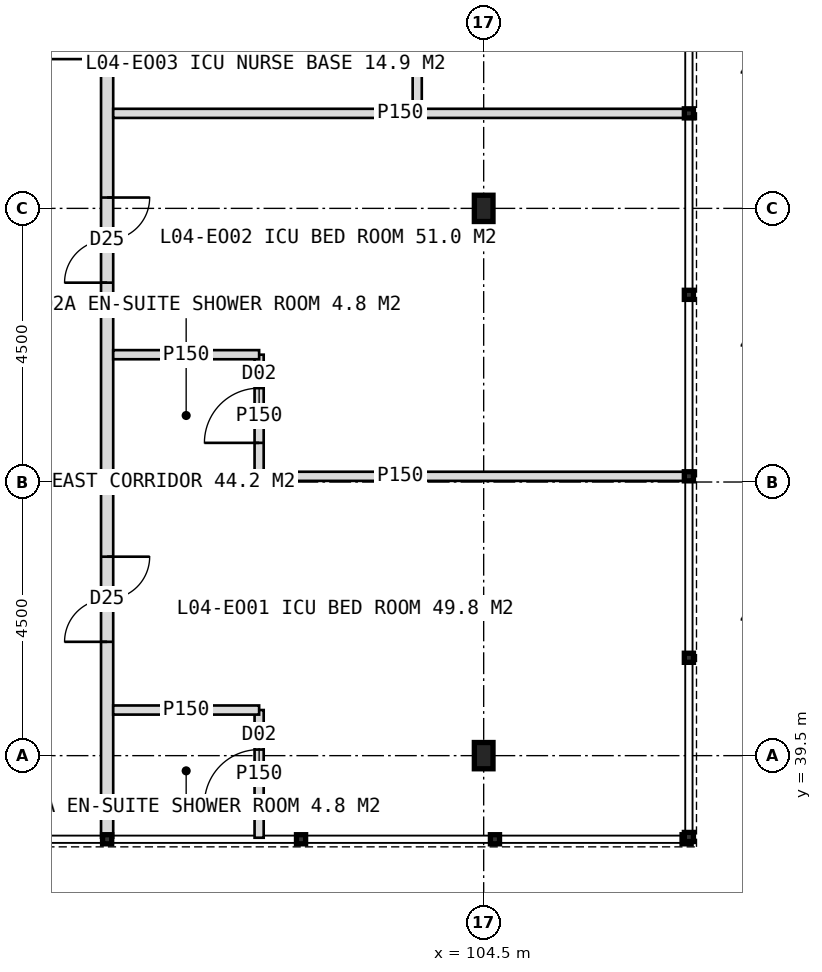
"""IFC4 building model, lengths in metres.
Left out: names, types, materials, properties, quantities, classifications, styles, units other than length and angle.
Written with IfcOpenShell. Run it as: python <this file> out.ifc"""

import sys

from ifc_helpers import new_model, si_unit, direction, frame, frame_2d, origin, origin_2d, place, context, subcontext, project, spatial, rectangle, i_section, extrude, element, fill, save


model = new_model("IFC4")
c1 = context("Model", 3, precision=1e-05, world=origin(), true_north=direction((0.0, 1.0)))
c2 = subcontext(c1, "Body", "Model", "MODEL_VIEW")
j1 = project(units=[si_unit("LENGTHUNIT", "METRE"), si_unit("PLANEANGLEUNIT", "RADIAN")], contexts=[c1])
p1 = place(None, origin())
s1 = spatial("IfcSite", under=j1, at=p1, CompositionType="ELEMENT")
p2 = place(p1, origin())
s2 = spatial("IfcBuilding", under=s1, at=p2, CompositionType="ELEMENT")
p3 = place(p2, frame((0.0, 0.0, 21.0)))
s3 = spatial("IfcBuildingStorey", under=s2, at=p3, CompositionType="ELEMENT", Elevation=21.0)
for number, where, z_axis, x_axis in (
    (1, (104.5, 39.5, 0.0), (0.0, 0.0, 1.0), (1.0, 0.0, 0.0)),
    (2, (104.5, 48.5, 0.0), (0.0, 0.0, 1.0), (1.0, 0.0, 0.0)),
):
    element("IfcColumn", number, at=place(p3, frame(where, z_axis=z_axis, x_axis=x_axis)), inside=s3, PredefinedType="COLUMN", context=c2, shape_type="SweptSolid", body=[
        extrude(i_section(OverallWidth=0.307, OverallDepth=0.432, WebThickness=0.021, FlangeThickness=0.04, FilletRadius=0.027, at=origin_2d()), origin(), (0.0, 0.0, 1.0), 5.0),
    ])
p4 = place(p3, frame((98.307, 38.15, 0.0), z_axis=(0.0, 0.0, 1.0), x_axis=(0.0, 1.0, 0.0)))
e3 = element("IfcWall", 3, at=p4, inside=s3, PredefinedType="PARTITIONING", context=c2, shape_type="SweptSolid", body=[
    extrude(rectangle(XDim=47.7, YDim=0.2, at=frame_2d((23.85, 0.0))), origin(), (0.0, 0.0, 1.0), 4.7),
])
p5 = place(p4, frame((45.7, 0.0, 0.0)))
e4 = element("IfcOpeningElement", 4, at=p5, cuts=e3, PredefinedType="OPENING", context=c2, shape_type="SweptSolid", body=[
    extrude(rectangle(XDim=1.2, YDim=2.1, at=frame_2d((0.6, 1.05))), frame((0.0, 0.11, 0.0), z_axis=(0.0, -1.0, 0.0), x_axis=(1.0, 0.0, 0.0)), (0.0, 0.0, 1.0), 0.22),
])
p6 = place(p4, frame((36.244, 0.0, 0.0)))
e5 = element("IfcOpeningElement", 5, at=p6, cuts=e3, PredefinedType="OPENING", context=c2, shape_type="SweptSolid", body=[
    extrude(rectangle(XDim=1.0, YDim=2.1, at=frame_2d((0.5, 1.05))), frame((0.0, 0.11, 0.0), z_axis=(0.0, -1.0, 0.0), x_axis=(1.0, 0.0, 0.0)), (0.0, 0.0, 1.0), 0.22),
])
p7 = place(p4, frame((15.297, 0.0, 0.0)))
e6 = element("IfcOpeningElement", 6, at=p7, cuts=e3, PredefinedType="OPENING", context=c2, shape_type="SweptSolid", body=[
    extrude(rectangle(XDim=1.4, YDim=2.2, at=frame_2d((0.7, 1.1))), frame((0.0, 0.11, 0.0), z_axis=(0.0, -1.0, 0.0), x_axis=(1.0, 0.0, 0.0)), (0.0, 0.0, 1.0), 0.22),
])
p8 = place(p4, frame((3.222, 0.0, 0.0)))
e7 = element("IfcOpeningElement", 7, at=p8, cuts=e3, PredefinedType="OPENING", context=c2, shape_type="SweptSolid", body=[
    extrude(rectangle(XDim=1.4, YDim=2.2, at=frame_2d((0.7, 1.1))), frame((0.0, 0.11, 0.0), z_axis=(0.0, -1.0, 0.0), x_axis=(1.0, 0.0, 0.0)), (0.0, 0.0, 1.0), 0.22),
])
p9 = place(p4, frame((9.128, 0.0, 0.0)))
e8 = element("IfcOpeningElement", 8, at=p9, cuts=e3, PredefinedType="OPENING", context=c2, shape_type="SweptSolid", body=[
    extrude(rectangle(XDim=1.4, YDim=2.2, at=frame_2d((0.7, 1.1))), frame((0.0, 0.11, 0.0), z_axis=(0.0, -1.0, 0.0), x_axis=(1.0, 0.0, 0.0)), (0.0, 0.0, 1.0), 0.22),
])
p10 = place(p4, frame((12.805, 0.0, 0.0)))
e9 = element("IfcOpeningElement", 9, at=p10, cuts=e3, PredefinedType="OPENING", context=c2, shape_type="SweptSolid", body=[
    extrude(rectangle(XDim=1.0, YDim=2.1, at=frame_2d((0.5, 1.05))), frame((0.0, 0.11, 0.0), z_axis=(0.0, -1.0, 0.0), x_axis=(1.0, 0.0, 0.0)), (0.0, 0.0, 1.0), 0.22),
])
p11 = place(p4, frame((24.05, 0.0, 0.0)))
e10 = element("IfcOpeningElement", 10, at=p11, cuts=e3, PredefinedType="OPENING", context=c2, shape_type="SweptSolid", body=[
    extrude(rectangle(XDim=1.4, YDim=2.2, at=frame_2d((0.7, 1.1))), frame((0.0, 0.11, 0.0), z_axis=(0.0, -1.0, 0.0), x_axis=(1.0, 0.0, 0.0)), (0.0, 0.0, 1.0), 0.22),
])
p12 = place(p4, frame((30.019, 0.0, 0.0)))
e11 = element("IfcOpeningElement", 11, at=p12, cuts=e3, PredefinedType="OPENING", context=c2, shape_type="SweptSolid", body=[
    extrude(rectangle(XDim=1.4, YDim=2.2, at=frame_2d((0.7, 1.1))), frame((0.0, 0.11, 0.0), z_axis=(0.0, -1.0, 0.0), x_axis=(1.0, 0.0, 0.0)), (0.0, 0.0, 1.0), 0.22),
])
p13 = place(p4, frame((33.695, 0.0, 0.0)))
e12 = element("IfcOpeningElement", 12, at=p13, cuts=e3, PredefinedType="OPENING", context=c2, shape_type="SweptSolid", body=[
    extrude(rectangle(XDim=1.0, YDim=2.1, at=frame_2d((0.5, 1.05))), frame((0.0, 0.11, 0.0), z_axis=(0.0, -1.0, 0.0), x_axis=(1.0, 0.0, 0.0)), (0.0, 0.0, 1.0), 0.22),
])
for number, where, z_axis, x_axis in (
    (13, (107.85, 44.094, 0.0), (0.0, 0.0, 1.0), (-1.0, 0.0, 0.0)),
    (14, (107.85, 50.062, 0.0), (0.0, 0.0, 1.0), (-1.0, 0.0, 0.0)),
):
    element("IfcWall", number, at=place(p3, frame(where, z_axis=z_axis, x_axis=x_axis)), inside=s3, PredefinedType="PARTITIONING", context=c2, shape_type="SweptSolid", body=[
        extrude(rectangle(XDim=9.443, YDim=0.15, at=frame_2d((4.722, 0.0))), origin(), (0.0, 0.0, 1.0), 4.7),
    ])
p14 = place(p3, frame((103.407, 50.062, 0.0), z_axis=(0.0, 0.0, 1.0), x_axis=(0.0, 1.0, 0.0)))
e15 = element("IfcWall", 15, at=p14, inside=s3, PredefinedType="PARTITIONING", context=c2, shape_type="SweptSolid", body=[
    extrude(rectangle(XDim=2.984, YDim=0.15, at=frame_2d((1.492, 0.0))), origin(), (0.0, 0.0, 1.0), 4.7),
])
p15 = place(p14, frame((0.992, 0.0, 0.0)))
e16 = element("IfcOpeningElement", 16, at=p15, cuts=e15, PredefinedType="OPENING", context=c2, shape_type="SweptSolid", body=[
    extrude(rectangle(XDim=1.0, YDim=2.1, at=frame_2d((0.5, 1.05))), frame((0.0, 0.085, 0.0), z_axis=(0.0, -1.0, 0.0), x_axis=(1.0, 0.0, 0.0)), (0.0, 0.0, 1.0), 0.17),
])
p16 = place(p3, frame((100.807, 38.15, 0.0), z_axis=(0.0, 0.0, 1.0), x_axis=(0.0, 1.0, 0.0)))
e17 = element("IfcWall", 17, at=p16, inside=s3, PredefinedType="PARTITIONING", context=c2, shape_type="SweptSolid", body=[
    extrude(rectangle(XDim=2.1, YDim=0.15, at=frame_2d((1.05, 0.0))), origin(), (0.0, 0.0, 1.0), 4.7),
])
p17 = place(p16, frame((0.55, 0.0, 0.0)))
e18 = element("IfcOpeningElement", 18, at=p17, cuts=e17, PredefinedType="OPENING", context=c2, shape_type="SweptSolid", body=[
    extrude(rectangle(XDim=0.9, YDim=2.1, at=frame_2d((0.45, 1.05))), frame((0.0, 0.085, 0.0), z_axis=(0.0, -1.0, 0.0), x_axis=(1.0, 0.0, 0.0)), (0.0, 0.0, 1.0), 0.17),
])
p18 = place(p3, frame((98.407, 40.25, 0.0), z_axis=(0.0, 0.0, 1.0), x_axis=(1.0, 0.0, 0.0)))
e19 = element("IfcWall", 19, at=p18, inside=s3, PredefinedType="PARTITIONING", context=c2, shape_type="SweptSolid", body=[
    extrude(rectangle(XDim=2.4, YDim=0.15, at=frame_2d((1.2, 0.0))), origin(), (0.0, 0.0, 1.0), 4.7),
])
p19 = place(p3, frame((100.807, 44.094, 0.0), z_axis=(0.0, 0.0, 1.0), x_axis=(0.0, 1.0, 0.0)))
e20 = element("IfcWall", 20, at=p19, inside=s3, PredefinedType="PARTITIONING", context=c2, shape_type="SweptSolid", body=[
    extrude(rectangle(XDim=2.0, YDim=0.15, at=frame_2d((1.0, 0.0))), origin(), (0.0, 0.0, 1.0), 4.7),
])
p20 = place(p19, frame((0.55, 0.0, 0.0)))
e21 = element("IfcOpeningElement", 21, at=p20, cuts=e20, PredefinedType="OPENING", context=c2, shape_type="SweptSolid", body=[
    extrude(rectangle(XDim=0.9, YDim=2.1, at=frame_2d((0.45, 1.05))), frame((0.0, 0.085, 0.0), z_axis=(0.0, -1.0, 0.0), x_axis=(1.0, 0.0, 0.0)), (0.0, 0.0, 1.0), 0.17),
])
p21 = place(p3, frame((98.407, 46.094, 0.0), z_axis=(0.0, 0.0, 1.0), x_axis=(1.0, 0.0, 0.0)))
e22 = element("IfcWall", 22, at=p21, inside=s3, PredefinedType="PARTITIONING", context=c2, shape_type="SweptSolid", body=[
    extrude(rectangle(XDim=2.4, YDim=0.15, at=frame_2d((1.2, 0.0))), origin(), (0.0, 0.0, 1.0), 4.7),
])
p22 = place(p17, origin())
e23 = element("IfcDoor", 23, at=p22, inside=s3, OperationType="SINGLE_SWING_LEFT", PredefinedType="DOOR", context=c2, shape_type="SweptSolid", body=[
    extrude(rectangle(XDim=0.9, YDim=2.1, at=frame_2d((0.45, 1.05))), frame((0.0, 0.025, 0.0), z_axis=(0.0, -1.0, 0.0), x_axis=(1.0, 0.0, 0.0)), (0.0, 0.0, 1.0), 0.05),
])
fill(e18, e23)
p23 = place(p20, origin())
e24 = element("IfcDoor", 24, at=p23, inside=s3, OperationType="SINGLE_SWING_LEFT", PredefinedType="DOOR", context=c2, shape_type="SweptSolid", body=[
    extrude(rectangle(XDim=0.9, YDim=2.1, at=frame_2d((0.45, 1.05))), frame((0.0, 0.025, 0.0), z_axis=(0.0, -1.0, 0.0), x_axis=(1.0, 0.0, 0.0)), (0.0, 0.0, 1.0), 0.05),
])
fill(e21, e24)
p24 = place(p8, origin())
e25 = element("IfcDoor", 25, at=p24, inside=s3, OperationType="DOUBLE_DOOR_SINGLE_SWING", PredefinedType="DOOR", context=c2, shape_type="SweptSolid", body=[
    extrude(rectangle(XDim=1.4, YDim=2.2, at=frame_2d((0.7, 1.1))), frame((0.0, 0.025, 0.0), z_axis=(0.0, -1.0, 0.0), x_axis=(1.0, 0.0, 0.0)), (0.0, 0.0, 1.0), 0.05),
])
fill(e7, e25)
p25 = place(p9, origin())
e26 = element("IfcDoor", 26, at=p25, inside=s3, OperationType="DOUBLE_DOOR_SINGLE_SWING", PredefinedType="DOOR", context=c2, shape_type="SweptSolid", body=[
    extrude(rectangle(XDim=1.4, YDim=2.2, at=frame_2d((0.7, 1.1))), frame((0.0, 0.025, 0.0), z_axis=(0.0, -1.0, 0.0), x_axis=(1.0, 0.0, 0.0)), (0.0, 0.0, 1.0), 0.05),
])
fill(e8, e26)
p26 = place(p10, origin())
e27 = element("IfcDoor", 27, at=p26, inside=s3, OperationType="SINGLE_SWING_LEFT", PredefinedType="DOOR", context=c2, shape_type="SweptSolid", body=[
    extrude(rectangle(XDim=1.0, YDim=2.1, at=frame_2d((0.5, 1.05))), frame((0.0, 0.025, 0.0), z_axis=(0.0, -1.0, 0.0), x_axis=(1.0, 0.0, 0.0)), (0.0, 0.0, 1.0), 0.05),
])
fill(e9, e27)
p27 = place(p15, origin())
e28 = element("IfcDoor", 28, at=p27, inside=s3, OperationType="SINGLE_SWING_RIGHT", PredefinedType="DOOR", context=c2, shape_type="SweptSolid", body=[
    extrude(rectangle(XDim=1.0, YDim=2.1, at=frame_2d((0.5, 1.05))), frame((0.0, 0.025, 0.0), z_axis=(0.0, -1.0, 0.0), x_axis=(1.0, 0.0, 0.0)), (0.0, 0.0, 1.0), 0.05),
])
fill(e16, e28)
save(model, sys.argv[1])
